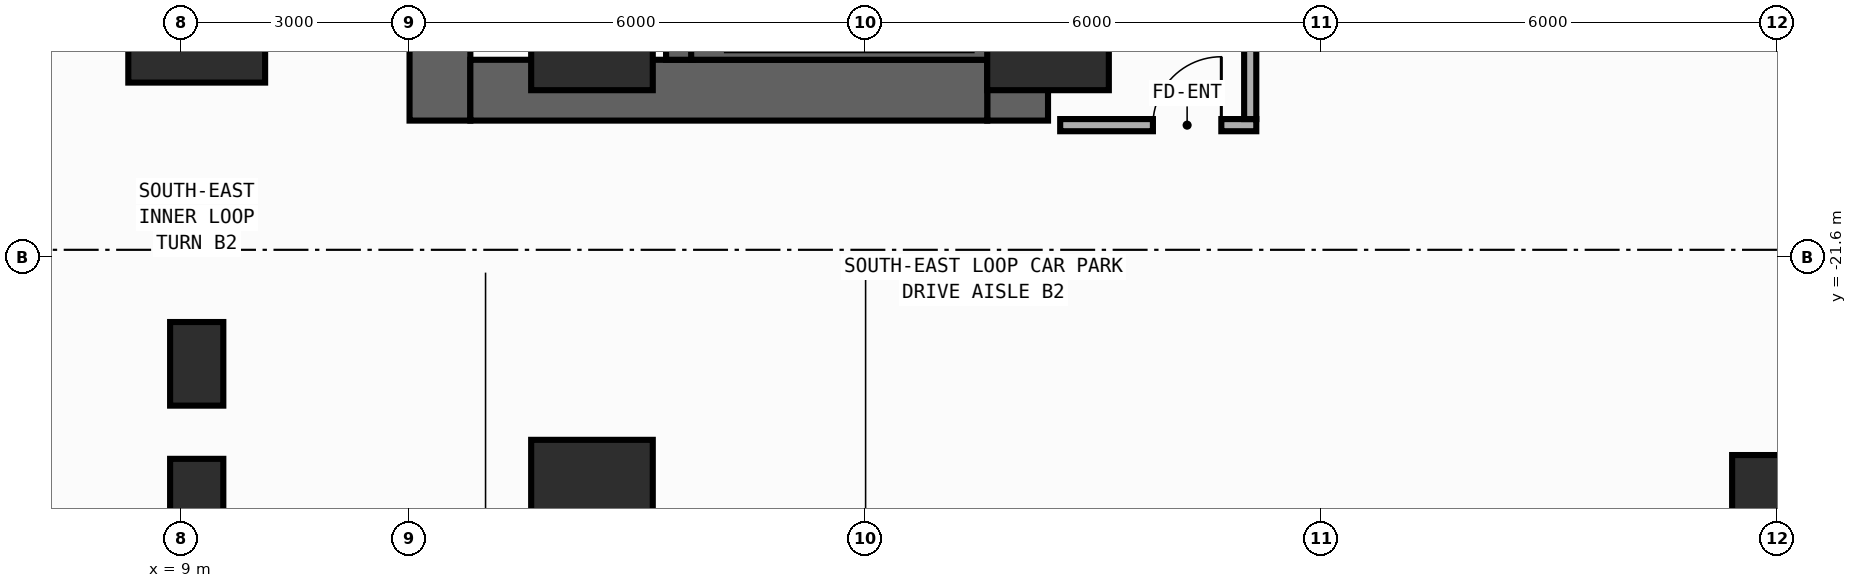
"""IFC4 building model, lengths in metres.
Left out: names, types, materials, properties, quantities, classifications, styles, units other than length and angle.
Written with IfcOpenShell. Run it as: python <this file> out.ifc"""

import sys

from ifc_helpers import new_model, si_unit, direction, frame, frame_2d, origin, origin_2d, place, context, subcontext, project, spatial, rectangle, extrude, element, fill, save


model = new_model("IFC4")
c1 = context("Model", 3, precision=1e-05, world=origin(), true_north=direction((0.0, 1.0)))
c2 = subcontext(c1, "Body", "Model", "MODEL_VIEW")
j1 = project(units=[si_unit("LENGTHUNIT", "METRE"), si_unit("PLANEANGLEUNIT", "RADIAN")], contexts=[c1])
p1 = place(None, origin())
s1 = spatial("IfcSite", under=j1, at=p1, CompositionType="ELEMENT")
p2 = place(p1, origin())
s2 = spatial("IfcBuilding", under=s1, at=p2, CompositionType="ELEMENT")
p3 = place(p2, frame((0.0, 0.0, -9.0)))
s3 = spatial("IfcBuildingStorey", under=s2, at=p3, CompositionType="ELEMENT", Elevation=-9.0)
p4 = place(p3, frame((12.4, -19.8, 0.0), z_axis=(0.0, 0.0, 1.0), x_axis=(0.0, 1.0, 0.0)))
e1 = element("IfcWall", 1, at=p4, inside=s3, PredefinedType="SHEAR", context=c2, shape_type="SweptSolid", body=[
    extrude(rectangle(XDim=27.0, YDim=0.8, at=frame_2d((13.5, 0.0))), origin(), (0.0, 0.0, 1.0), 4.2),
])
p5 = place(p4, frame((19.875, 0.0, 0.0)))
e2 = element("IfcOpeningElement", 2, at=p5, cuts=e1, PredefinedType="OPENING", context=c2, shape_type="SweptSolid", body=[
    extrude(rectangle(XDim=0.85, YDim=2.1, at=frame_2d((0.425, 1.05))), frame((0.0, 0.41, 0.0), z_axis=(0.0, -1.0, 0.0), x_axis=(1.0, 0.0, 0.0)), (0.0, 0.0, 1.0), 0.82),
])
p6 = place(p4, frame((10.175, 0.0, 0.0)))
e3 = element("IfcOpeningElement", 3, at=p6, cuts=e1, PredefinedType="OPENING", context=c2, shape_type="SweptSolid", body=[
    extrude(rectangle(XDim=0.85, YDim=2.1, at=frame_2d((0.425, 1.05))), frame((0.0, 0.41, 0.0), z_axis=(0.0, -1.0, 0.0), x_axis=(1.0, 0.0, 0.0)), (0.0, 0.0, 1.0), 0.82),
])
p7 = place(p4, frame((12.725, 0.0, 0.0)))
e4 = element("IfcOpeningElement", 4, at=p7, cuts=e1, PredefinedType="OPENING", context=c2, shape_type="SweptSolid", body=[
    extrude(rectangle(XDim=1.15, YDim=2.2, at=frame_2d((0.575, 1.1))), frame((0.0, 0.41, 0.0), z_axis=(0.0, -1.0, 0.0), x_axis=(1.0, 0.0, 0.0)), (0.0, 0.0, 1.0), 0.82),
])
p8 = place(p4, frame((25.125, 0.0, 0.0)))
e5 = element("IfcOpeningElement", 5, at=p8, cuts=e1, PredefinedType="OPENING", context=c2, shape_type="SweptSolid", body=[
    extrude(rectangle(XDim=0.85, YDim=2.1, at=frame_2d((0.425, 1.05))), frame((0.0, 0.41, 0.0), z_axis=(0.0, -1.0, 0.0), x_axis=(1.0, 0.0, 0.0)), (0.0, 0.0, 1.0), 0.82),
])
p9 = place(p3, frame((20.0, -19.8, 0.0), z_axis=(0.0, 0.0, 1.0), x_axis=(0.0, 1.0, 0.0)))
e6 = element("IfcWall", 6, at=p9, inside=s3, PredefinedType="SHEAR", context=c2, shape_type="SweptSolid", body=[
    extrude(rectangle(XDim=27.0, YDim=0.8, at=frame_2d((13.5, 0.0))), origin(), (0.0, 0.0, 1.0), 4.2),
])
p10 = place(p3, frame((12.8, -19.4, 0.0), z_axis=(0.0, 0.0, 1.0), x_axis=(1.0, 0.0, 0.0)))
e7 = element("IfcWall", 7, at=p10, inside=s3, PredefinedType="SHEAR", context=c2, shape_type="SweptSolid", body=[
    extrude(rectangle(XDim=6.8, YDim=0.8, at=frame_2d((3.4, 0.0))), origin(), (0.0, 0.0, 1.0), 4.2),
])
p11 = place(p3, frame((15.55, -19.0, 0.0), z_axis=(0.0, 0.0, 1.0), x_axis=(0.0, 1.0, 0.0)))
e8 = element("IfcWall", 8, at=p11, inside=s3, PredefinedType="SHEAR", context=c2, shape_type="SweptSolid", body=[
    extrude(rectangle(XDim=25.4, YDim=0.35, at=frame_2d((12.7, 0.0))), origin(), (0.0, 0.0, 1.0), 4.2),
])
p12 = place(p11, frame((11.925, 0.0, 0.0)))
e9 = element("IfcOpeningElement", 9, at=p12, cuts=e8, PredefinedType="OPENING", context=c2, shape_type="SweptSolid", body=[
    extrude(rectangle(XDim=1.15, YDim=2.2, at=frame_2d((0.575, 1.1))), frame((0.0, 0.185, 0.0), z_axis=(0.0, -1.0, 0.0), x_axis=(1.0, 0.0, 0.0)), (0.0, 0.0, 1.0), 0.37),
])
p13 = place(p11, frame((24.325, 0.0, 0.0)))
e10 = element("IfcOpeningElement", 10, at=p13, cuts=e8, PredefinedType="OPENING", context=c2, shape_type="SweptSolid", body=[
    extrude(rectangle(XDim=0.85, YDim=2.1, at=frame_2d((0.425, 1.05))), frame((0.0, 0.185, 0.0), z_axis=(0.0, -1.0, 0.0), x_axis=(1.0, 0.0, 0.0)), (0.0, 0.0, 1.0), 0.37),
])
p14 = place(p3, frame((15.705, -18.89, 0.0), z_axis=(0.0, 0.0, 1.0), x_axis=(1.0, 0.0, 0.0)))
e11 = element("IfcWall", 11, at=p14, inside=s3, PredefinedType="SHEAR", context=c2, shape_type="SweptSolid", body=[
    extrude(rectangle(XDim=3.915, YDim=0.22, at=frame_2d((1.958, 0.0))), origin(), (0.0, 0.0, 1.0), 4.2),
])
p15 = place(p3, frame((9.2, -18.6, 0.0), z_axis=(0.0, 0.0, 1.0), x_axis=(1.0, 0.0, 0.0)))
e12 = element("IfcColumn", 12, at=p15, inside=s3, PredefinedType="COLUMN", context=c2, shape_type="SweptSolid", body=[
    extrude(rectangle(XDim=1.8, YDim=1.4, at=origin_2d()), origin(), (0.0, 0.0, 1.0), 4.5),
])
for number, where, z_axis, x_axis in (
    (13, (20.4, -18.6, 0.0), (0.0, 0.0, 1.0), (1.0, 0.0, 0.0)),
    (14, (14.4, -18.6, 0.0), (0.0, 0.0, 1.0), (1.0, 0.0, 0.0)),
):
    element("IfcColumn", number, at=place(p3, frame(where, z_axis=z_axis, x_axis=x_axis)), inside=s3, PredefinedType="COLUMN", context=c2, shape_type="SweptSolid", body=[
        extrude(rectangle(XDim=1.6, YDim=1.6, at=origin_2d()), origin(), (0.0, 0.0, 1.0), 4.5),
    ])
p16 = place(p3, frame((30.0, -24.8, 0.0), z_axis=(0.0, 0.0, 1.0), x_axis=(1.0, 0.0, 0.0)))
e15 = element("IfcColumn", 15, at=p16, inside=s3, PredefinedType="COLUMN", context=c2, shape_type="SweptSolid", body=[
    extrude(rectangle(XDim=1.2, YDim=1.2, at=origin_2d()), origin(), (0.0, 0.0, 1.0), 4.5),
])
p17 = place(p3, frame((9.2, -24.8, 0.0), z_axis=(0.0, 0.0, 1.0), x_axis=(1.0, 0.0, 0.0)))
e16 = element("IfcColumn", 16, at=p17, inside=s3, PredefinedType="PILASTER", context=c2, shape_type="SweptSolid", body=[
    extrude(rectangle(XDim=0.7, YDim=1.1, at=origin_2d()), origin(), (0.0, 0.0, 1.0), 4.5),
])
p18 = place(p3, frame((14.4, -24.8, 0.0), z_axis=(0.0, 0.0, 1.0), x_axis=(1.0, 0.0, 0.0)))
e17 = element("IfcColumn", 17, at=p18, inside=s3, PredefinedType="COLUMN", context=c2, shape_type="SweptSolid", body=[
    extrude(rectangle(XDim=1.6, YDim=1.6, at=origin_2d()), origin(), (0.0, 0.0, 1.0), 4.5),
])
p19 = place(p3, frame((9.2, -23.0, 0.0), z_axis=(0.0, 0.0, 1.0), x_axis=(1.0, 0.0, 0.0)))
e18 = element("IfcColumn", 18, at=p19, inside=s3, PredefinedType="PILASTER", context=c2, shape_type="SweptSolid", body=[
    extrude(rectangle(XDim=0.7, YDim=1.1, at=origin_2d()), origin(), (0.0, 0.0, 1.0), 4.5),
])
p20 = place(p3, frame((20.56, -19.86, 0.0), z_axis=(0.0, 0.0, 1.0), x_axis=(1.0, 0.0, 0.0)))
e19 = element("IfcWall", 19, at=p20, inside=s3, PredefinedType="PARTITIONING", context=c2, shape_type="SweptSolid", body=[
    extrude(rectangle(XDim=2.58, YDim=0.16, at=frame_2d((1.29, 0.0))), origin(), (0.0, 0.0, 1.0), 4.2),
])
p21 = place(p20, frame((1.22, 0.0, 0.0)))
e20 = element("IfcOpeningElement", 20, at=p21, cuts=e19, PredefinedType="OPENING", context=c2, shape_type="SweptSolid", body=[
    extrude(rectangle(XDim=0.9, YDim=2.15, at=frame_2d((0.45, 1.075))), frame((0.0, 0.09, 0.0), z_axis=(0.0, -1.0, 0.0), x_axis=(1.0, 0.0, 0.0)), (0.0, 0.0, 1.0), 0.18),
])
p22 = place(p3, frame((23.06, -19.78, 0.0), z_axis=(0.0, 0.0, 1.0), x_axis=(0.0, 1.0, 0.0)))
e21 = element("IfcWall", 21, at=p22, inside=s3, PredefinedType="PARTITIONING", context=c2, shape_type="SweptSolid", body=[
    extrude(rectangle(XDim=12.74, YDim=0.16, at=frame_2d((6.37, 0.0))), origin(), (0.0, 0.0, 1.0), 4.2),
])
p23 = place(p22, frame((4.302, 0.0, 0.0)))
e22 = element("IfcOpeningElement", 22, at=p23, cuts=e21, PredefinedType="OPENING", context=c2, shape_type="SweptSolid", body=[
    extrude(rectangle(XDim=0.9, YDim=2.15, at=frame_2d((0.45, 1.075))), frame((0.0, 0.09, 0.0), z_axis=(0.0, -1.0, 0.0), x_axis=(1.0, 0.0, 0.0)), (0.0, 0.0, 1.0), 0.18),
])
p24 = place(p21, origin())
e23 = element("IfcDoor", 23, at=p24, inside=s3, OperationType="SINGLE_SWING_RIGHT", PredefinedType="DOOR", context=c2, shape_type="SweptSolid", body=[
    extrude(rectangle(XDim=0.9, YDim=2.15, at=frame_2d((0.45, 1.075))), frame((0.0, 0.025, 0.0), z_axis=(0.0, -1.0, 0.0), x_axis=(1.0, 0.0, 0.0)), (0.0, 0.0, 1.0), 0.05),
])
fill(e20, e23)
save(model, sys.argv[1])
